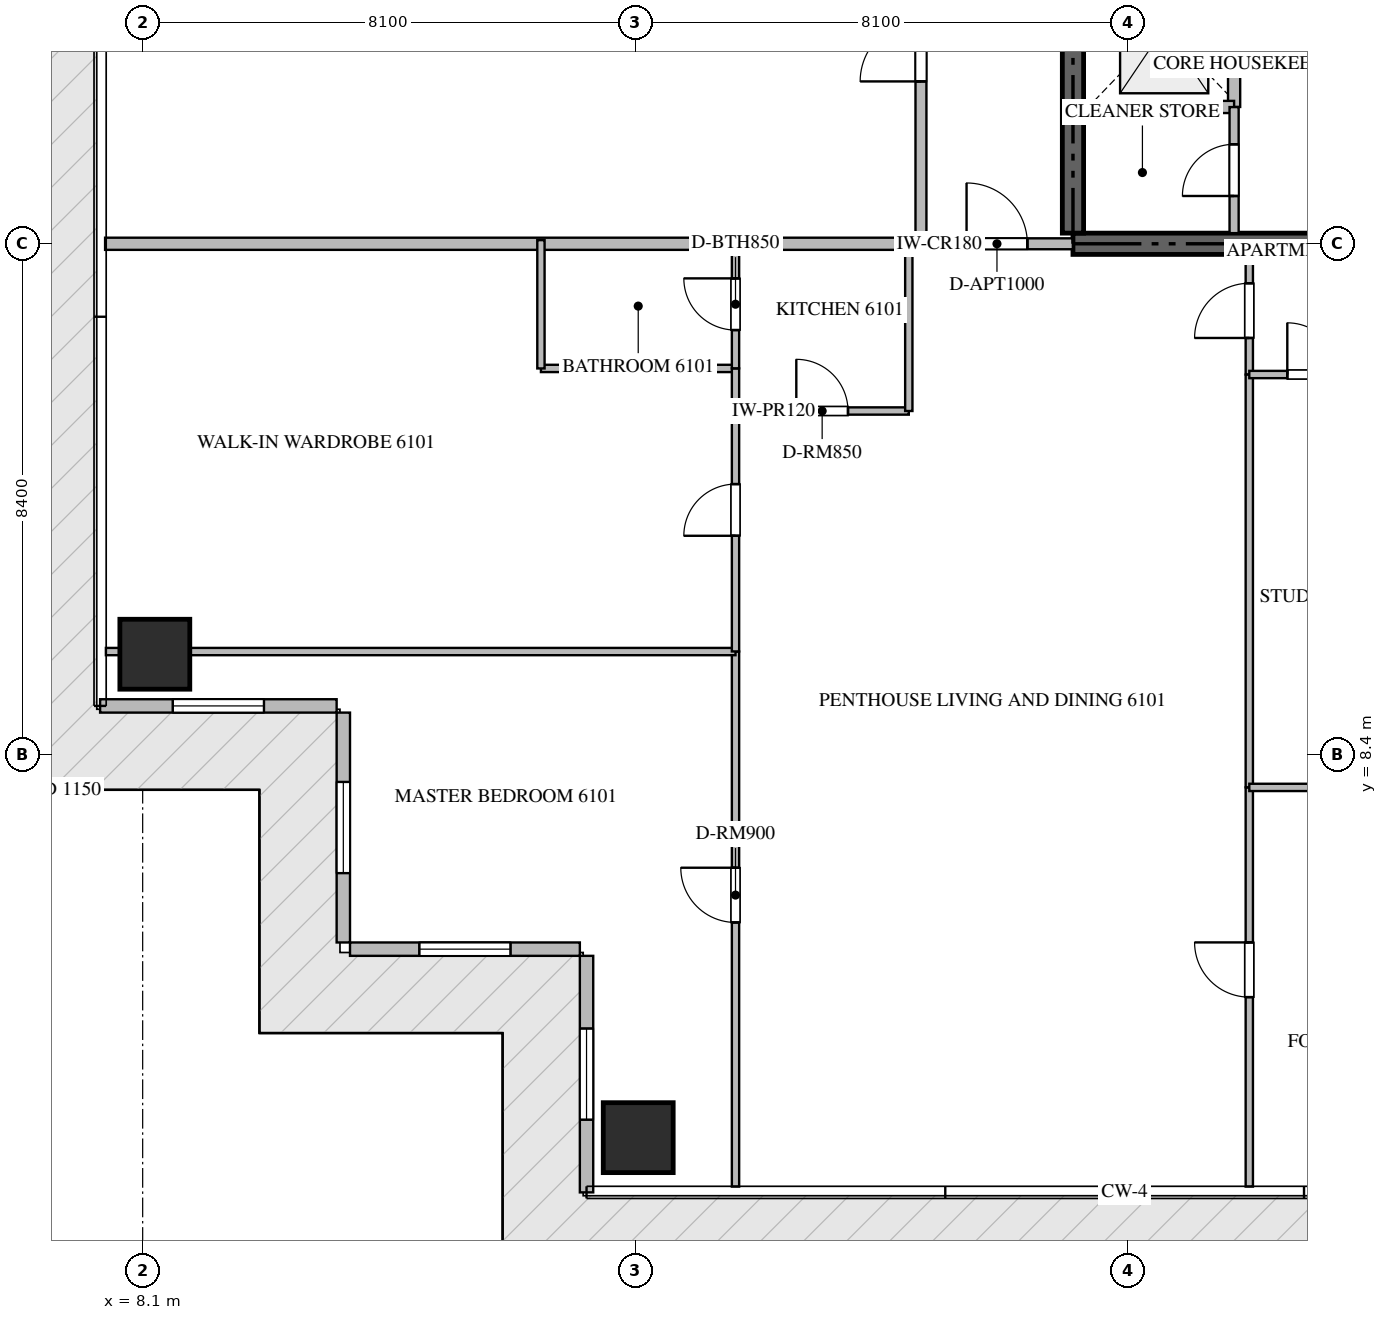
"""IFC4 building model, lengths in metres.
Left out: names, types, materials, properties, quantities, classifications, styles, units other than length and angle.
Written with IfcOpenShell. Run it as: python <this file> out.ifc"""

import sys

from ifc_helpers import new_model, si_unit, direction, frame, frame_2d, origin, origin_2d, place, context, subcontext, project, spatial, rectangle, extrude, source, transform, mapped, element, fill, save


model = new_model("IFC4")
c1 = context("Model", 3, precision=1e-05, world=origin(), true_north=direction((0.0, 1.0)))
c2 = subcontext(c1, "Body", "Model", "MODEL_VIEW")
j1 = project(units=[si_unit("LENGTHUNIT", "METRE"), si_unit("PLANEANGLEUNIT", "RADIAN")], contexts=[c1])
p1 = place(None, origin())
s1 = spatial("IfcSite", under=j1, at=p1, CompositionType="ELEMENT")
p2 = place(p1, origin())
s2 = spatial("IfcBuilding", under=s1, at=p2, CompositionType="ELEMENT")
p3 = place(p2, frame((0.0, 0.0, 245.1)))
s3 = spatial("IfcBuildingStorey", under=s2, at=p3, CompositionType="ELEMENT", Elevation=245.1)
p4 = place(p3, frame((23.4, 16.8, -0.26), z_axis=(0.0, 0.0, 1.0), x_axis=(1.0, 0.0, 0.0)))
e1 = element("IfcWall", 1, at=p4, inside=s3, PredefinedType="SHEAR", context=c2, shape_type="SweptSolid", body=[
    extrude(rectangle(XDim=18.0, YDim=0.35, at=frame_2d((9.0, 0.0))), origin(), (0.0, 0.0, 1.0), 3.848),
])
p5 = place(p3, frame((23.4, 16.975, -0.26), z_axis=(0.0, 0.0, 1.0), x_axis=(0.0, 1.0, 0.0)))
e2 = element("IfcWall", 2, at=p5, inside=s3, PredefinedType="SHEAR", context=c2, shape_type="SweptSolid", body=[
    extrude(rectangle(XDim=4.875, YDim=0.35, at=frame_2d((2.438, 0.0))), origin(), (0.0, 0.0, 1.0), 3.848),
])
m1 = source(origin(), c2, "Body", "SweptSolid", [
    extrude(rectangle(XDim=1.15, YDim=1.15, at=origin_2d()), origin(), (0.0, 0.0, 1.0), 3.85),
])
for number, where, z_axis, x_axis in (
    (3, (16.25, 2.1, -0.26), (0.0, 0.0, 1.0), (1.0, 0.0, 0.0)),
    (4, (8.3, 10.05, -0.26), (0.0, 0.0, 1.0), (1.0, 0.0, 0.0)),
):
    element("IfcColumn", number, at=place(p3, frame(where, z_axis=z_axis, x_axis=x_axis)), inside=s3, PredefinedType="COLUMN", context=c2, shape_type="MappedRepresentation", body=[
        mapped(m1, transform((0.0, 0.0, 0.0), scale=1.0)),
    ])
p6 = place(p3, frame((7.4, 9.2, 0.0), z_axis=(0.0, 0.0, 1.0), x_axis=(1.0, 0.0, 0.0)))
e5 = element("IfcWall", 5, at=p6, inside=s3, PredefinedType="ELEMENTEDWALL", context=c2, shape_type="SweptSolid", body=[
    extrude(rectangle(XDim=3.89, YDim=0.22, at=frame_2d((1.945, 0.0))), origin(), (0.0, 0.0, 1.0), 3.575),
])
p7 = place(p6, frame((1.195, 0.0, 0.65)))
e6 = element("IfcOpeningElement", 6, at=p7, cuts=e5, PredefinedType="OPENING", context=c2, shape_type="SweptSolid", body=[
    extrude(rectangle(XDim=1.5, YDim=2.25, at=frame_2d((0.75, 1.125))), frame((0.0, 0.12, 0.0), z_axis=(0.0, -1.0, 0.0), x_axis=(1.0, 0.0, 0.0)), (0.0, 0.0, 1.0), 0.24),
])
p8 = place(p3, frame((11.4, 9.09, 0.0), z_axis=(0.0, 0.0, 1.0), x_axis=(0.0, -1.0, 0.0)))
e7 = element("IfcWall", 7, at=p8, inside=s3, PredefinedType="ELEMENTEDWALL", context=c2, shape_type="SweptSolid", body=[
    extrude(rectangle(XDim=3.78, YDim=0.22, at=frame_2d((1.89, 0.0))), origin(), (0.0, 0.0, 1.0), 3.575),
])
p9 = place(p8, frame((1.14, 0.0, 0.65)))
e8 = element("IfcOpeningElement", 8, at=p9, cuts=e7, PredefinedType="OPENING", context=c2, shape_type="SweptSolid", body=[
    extrude(rectangle(XDim=1.5, YDim=2.25, at=frame_2d((0.75, 1.125))), frame((0.0, 0.12, 0.0), z_axis=(0.0, -1.0, 0.0), x_axis=(1.0, 0.0, 0.0)), (0.0, 0.0, 1.0), 0.24),
])
p10 = place(p3, frame((11.51, 5.2, 0.0), z_axis=(0.0, 0.0, 1.0), x_axis=(1.0, 0.0, 0.0)))
e9 = element("IfcWall", 9, at=p10, inside=s3, PredefinedType="ELEMENTEDWALL", context=c2, shape_type="SweptSolid", body=[
    extrude(rectangle(XDim=3.78, YDim=0.22, at=frame_2d((1.89, 0.0))), origin(), (0.0, 0.0, 1.0), 3.575),
])
p11 = place(p10, frame((1.14, 0.0, 0.65)))
e10 = element("IfcOpeningElement", 10, at=p11, cuts=e9, PredefinedType="OPENING", context=c2, shape_type="SweptSolid", body=[
    extrude(rectangle(XDim=1.5, YDim=2.25, at=frame_2d((0.75, 1.125))), frame((0.0, 0.12, 0.0), z_axis=(0.0, -1.0, 0.0), x_axis=(1.0, 0.0, 0.0)), (0.0, 0.0, 1.0), 0.24),
])
p12 = place(p3, frame((15.4, 5.09, 0.0), z_axis=(0.0, 0.0, 1.0), x_axis=(0.0, -1.0, 0.0)))
e11 = element("IfcWall", 11, at=p12, inside=s3, PredefinedType="ELEMENTEDWALL", context=c2, shape_type="SweptSolid", body=[
    extrude(rectangle(XDim=3.89, YDim=0.22, at=frame_2d((1.945, 0.0))), origin(), (0.0, 0.0, 1.0), 3.575),
])
p13 = place(p12, frame((1.195, 0.0, 0.65)))
e12 = element("IfcOpeningElement", 12, at=p13, cuts=e11, PredefinedType="OPENING", context=c2, shape_type="SweptSolid", body=[
    extrude(rectangle(XDim=1.5, YDim=2.25, at=frame_2d((0.75, 1.125))), frame((0.0, 0.12, 0.0), z_axis=(0.0, -1.0, 0.0), x_axis=(1.0, 0.0, 0.0)), (0.0, 0.0, 1.0), 0.24),
])
p14 = place(p3, frame((26.05, 19.05, 0.0), z_axis=(0.0, 0.0, 1.0), x_axis=(0.0, 1.0, 0.0)))
e13 = element("IfcWall", 13, at=p14, inside=s3, PredefinedType="STANDARD", context=c2, shape_type="SweptSolid", body=[
    extrude(rectangle(XDim=2.5, YDim=0.2, at=frame_2d((1.25, 0.0))), origin(), (0.0, 0.0, 1.0), 3.59),
])
p15 = place(p3, frame((23.575, 19.05, 0.0), z_axis=(0.0, 0.0, 1.0), x_axis=(1.0, 0.0, 0.0)))
e14 = element("IfcWall", 14, at=p15, inside=s3, PredefinedType="STANDARD", context=c2, shape_type="SweptSolid", body=[
    extrude(rectangle(XDim=2.475, YDim=0.2, at=frame_2d((1.238, 0.0))), origin(), (0.0, 0.0, 1.0), 3.59),
])
p16 = place(p3, frame((26.05, 16.975, 0.0), z_axis=(0.0, 0.0, 1.0), x_axis=(0.0, 1.0, 0.0)))
e15 = element("IfcWall", 15, at=p16, inside=s3, PredefinedType="PARTITIONING", context=c2, shape_type="SweptSolid", body=[
    extrude(rectangle(XDim=2.073, YDim=0.15, at=frame_2d((1.037, 0.0))), origin(), (0.0, 0.0, 1.0), 3.59),
])
p17 = place(p16, frame((0.611, 0.0, 0.0)))
e16 = element("IfcOpeningElement", 16, at=p17, cuts=e15, PredefinedType="OPENING", context=c2, shape_type="SweptSolid", body=[
    extrude(rectangle(XDim=0.85, YDim=2.1, at=frame_2d((0.425, 1.05))), frame((0.0, 0.085, 0.0), z_axis=(0.0, -1.0, 0.0), x_axis=(1.0, 0.0, 0.0)), (0.0, 0.0, 1.0), 0.17),
])
p18 = place(p3, frame((7.482, 16.8, 0.0), z_axis=(0.0, 0.0, 1.0), x_axis=(1.0, 0.0, 0.0)))
e17 = element("IfcWall", 17, at=p18, inside=s3, PredefinedType="PARTITIONING", context=c2, shape_type="SweptSolid", body=[
    extrude(rectangle(XDim=13.418, YDim=0.2, at=frame_2d((6.709, 0.0))), origin(), (0.0, 0.0, 1.0), 3.59),
])
p19 = place(p3, frame((20.902, 16.8, 0.0), z_axis=(0.0, 0.0, 1.0), x_axis=(1.0, 0.0, 0.0)))
e18 = element("IfcWall", 18, at=p19, inside=s3, PredefinedType="PARTITIONING", context=c2, shape_type="SweptSolid", body=[
    extrude(rectangle(XDim=2.496, YDim=0.18, at=frame_2d((1.248, 0.0))), origin(), (0.0, 0.0, 1.0), 3.59),
])
p20 = place(p19, frame((0.748, 0.0, 0.0)))
e19 = element("IfcOpeningElement", 19, at=p20, cuts=e18, PredefinedType="OPENING", context=c2, shape_type="SweptSolid", body=[
    extrude(rectangle(XDim=1.0, YDim=2.15, at=frame_2d((0.5, 1.075))), frame((0.0, 0.1, 0.0), z_axis=(0.0, -1.0, 0.0), x_axis=(1.0, 0.0, 0.0)), (0.0, 0.0, 1.0), 0.2),
])
p21 = place(p3, frame((20.9, 16.8, 0.0), z_axis=(0.0, 0.0, 1.0), x_axis=(0.0, 1.0, 0.0)))
e20 = element("IfcWall", 20, at=p21, inside=s3, PredefinedType="PARTITIONING", context=c2, shape_type="SweptSolid", body=[
    extrude(rectangle(XDim=16.8, YDim=0.18, at=frame_2d((8.4, 0.0))), origin(), (0.0, 0.0, 1.0), 3.59),
])
p22 = place(p21, frame((2.67, 0.0, 0.0)))
e21 = element("IfcOpeningElement", 21, at=p22, cuts=e20, PredefinedType="OPENING", context=c2, shape_type="SweptSolid", body=[
    extrude(rectangle(XDim=1.0, YDim=2.15, at=frame_2d((0.5, 1.075))), frame((0.0, 0.1, 0.0), z_axis=(0.0, -1.0, 0.0), x_axis=(1.0, 0.0, 0.0)), (0.0, 0.0, 1.0), 0.2),
])
p23 = place(p21, frame((11.107, 0.0, 0.0)))
e22 = element("IfcOpeningElement", 22, at=p23, cuts=e20, PredefinedType="OPENING", context=c2, shape_type="SweptSolid", body=[
    extrude(rectangle(XDim=1.0, YDim=2.15, at=frame_2d((0.5, 1.075))), frame((0.0, 0.1, 0.0), z_axis=(0.0, -1.0, 0.0), x_axis=(1.0, 0.0, 0.0)), (0.0, 0.0, 1.0), 0.2),
])
p24 = place(p3, frame((17.85, 14.05, 0.0), z_axis=(0.0, 0.0, 1.0), x_axis=(1.0, 0.0, 0.0)))
e23 = element("IfcWall", 23, at=p24, inside=s3, PredefinedType="PARTITIONING", context=c2, shape_type="SweptSolid", body=[
    extrude(rectangle(XDim=2.85, YDim=0.12, at=frame_2d((1.425, 0.0))), origin(), (0.0, 0.0, 1.0), 3.59),
])
p25 = place(p24, frame((1.0, 0.0, 0.0)))
e24 = element("IfcOpeningElement", 24, at=p25, cuts=e23, PredefinedType="OPENING", context=c2, shape_type="SweptSolid", body=[
    extrude(rectangle(XDim=0.85, YDim=2.1, at=frame_2d((0.425, 1.05))), frame((0.0, 0.07, 0.0), z_axis=(0.0, -1.0, 0.0), x_axis=(1.0, 0.0, 0.0)), (0.0, 0.0, 1.0), 0.14),
])
p26 = place(p3, frame((20.7, 14.05, 0.0), z_axis=(0.0, 0.0, 1.0), x_axis=(0.0, 1.0, 0.0)))
e25 = element("IfcWall", 25, at=p26, inside=s3, PredefinedType="PARTITIONING", context=c2, shape_type="SweptSolid", body=[
    extrude(rectangle(XDim=2.81, YDim=0.12, at=frame_2d((1.405, 0.0))), origin(), (0.0, 0.0, 1.0), 3.59),
])
p27 = place(p3, frame((17.85, 1.295, 0.0), z_axis=(0.0, 0.0, 1.0), x_axis=(0.0, 1.0, 0.0)))
e26 = element("IfcWall", 26, at=p27, inside=s3, PredefinedType="PARTITIONING", context=c2, shape_type="SweptSolid", body=[
    extrude(rectangle(XDim=8.799, YDim=0.12, at=frame_2d((4.399, 0.0))), origin(), (0.0, 0.0, 1.0), 3.59),
])
p28 = place(p27, frame((4.344, 0.0, 0.0)))
e27 = element("IfcOpeningElement", 27, at=p28, cuts=e26, PredefinedType="OPENING", context=c2, shape_type="SweptSolid", body=[
    extrude(rectangle(XDim=0.9, YDim=2.1, at=frame_2d((0.45, 1.05))), frame((0.0, 0.07, 0.0), z_axis=(0.0, -1.0, 0.0), x_axis=(1.0, 0.0, 0.0)), (0.0, 0.0, 1.0), 0.14),
])
p29 = place(p3, frame((7.495, 10.094, 0.0), z_axis=(0.0, 0.0, 1.0), x_axis=(1.0, 0.0, 0.0)))
e28 = element("IfcWall", 28, at=p29, inside=s3, PredefinedType="PARTITIONING", context=c2, shape_type="SweptSolid", body=[
    extrude(rectangle(XDim=10.355, YDim=0.12, at=frame_2d((5.177, 0.0))), origin(), (0.0, 0.0, 1.0), 3.122),
])
p30 = place(p3, frame((14.65, 14.75, 0.0), z_axis=(0.0, 0.0, 1.0), x_axis=(1.0, 0.0, 0.0)))
e29 = element("IfcWall", 29, at=p30, inside=s3, PredefinedType="PARTITIONING", context=c2, shape_type="SweptSolid", body=[
    extrude(rectangle(XDim=3.2, YDim=0.12, at=frame_2d((1.6, 0.0))), origin(), (0.0, 0.0, 1.0), 3.59),
])
p31 = place(p3, frame((14.65, 14.75, 0.0), z_axis=(0.0, 0.0, 1.0), x_axis=(0.0, 1.0, 0.0)))
e30 = element("IfcWall", 30, at=p31, inside=s3, PredefinedType="PARTITIONING", context=c2, shape_type="SweptSolid", body=[
    extrude(rectangle(XDim=2.11, YDim=0.12, at=frame_2d((1.055, 0.0))), origin(), (0.0, 0.0, 1.0), 3.59),
])
p32 = place(p3, frame((17.85, 10.096, 0.0), z_axis=(0.0, 0.0, 1.0), x_axis=(0.0, 1.0, 0.0)))
e31 = element("IfcWall", 31, at=p32, inside=s3, PredefinedType="PARTITIONING", context=c2, shape_type="SweptSolid", body=[
    extrude(rectangle(XDim=4.654, YDim=0.12, at=frame_2d((2.327, 0.0))), origin(), (0.0, 0.0, 1.0), 3.59),
])
p33 = place(p32, frame((1.902, 0.0, 0.0)))
e32 = element("IfcOpeningElement", 32, at=p33, cuts=e31, PredefinedType="OPENING", context=c2, shape_type="SweptSolid", body=[
    extrude(rectangle(XDim=0.85, YDim=2.1, at=frame_2d((0.425, 1.05))), frame((0.0, 0.07, 0.0), z_axis=(0.0, -1.0, 0.0), x_axis=(1.0, 0.0, 0.0)), (0.0, 0.0, 1.0), 0.14),
])
p34 = place(p3, frame((17.85, 14.752, 0.0), z_axis=(0.0, 0.0, 1.0), x_axis=(0.0, 1.0, 0.0)))
e33 = element("IfcWall", 33, at=p34, inside=s3, PredefinedType="PARTITIONING", context=c2, shape_type="SweptSolid", body=[
    extrude(rectangle(XDim=2.108, YDim=0.12, at=frame_2d((1.054, 0.0))), origin(), (0.0, 0.0, 1.0), 3.59),
])
p35 = place(p34, frame((0.629, 0.0, 0.0)))
e34 = element("IfcOpeningElement", 34, at=p35, cuts=e33, PredefinedType="OPENING", context=c2, shape_type="SweptSolid", body=[
    extrude(rectangle(XDim=0.85, YDim=2.1, at=frame_2d((0.425, 1.05))), frame((0.0, 0.07, 0.0), z_axis=(0.0, -1.0, 0.0), x_axis=(1.0, 0.0, 0.0)), (0.0, 0.0, 1.0), 0.14),
])
p36 = place(p3, frame((26.3, 14.65, 0.0), z_axis=(0.0, 0.0, 1.0), x_axis=(0.0, 1.0, 0.0)))
e35 = element("IfcWall", 35, at=p36, inside=s3, PredefinedType="PARTITIONING", context=c2, shape_type="SweptSolid", body=[
    extrude(rectangle(XDim=1.975, YDim=0.12, at=frame_2d((0.988, 0.0))), origin(), (0.0, 0.0, 1.0), 3.59),
])
p37 = place(p36, frame((0.601, 0.0, 0.0)))
e36 = element("IfcOpeningElement", 36, at=p37, cuts=e35, PredefinedType="OPENING", context=c2, shape_type="SweptSolid", body=[
    extrude(rectangle(XDim=0.9, YDim=2.1, at=frame_2d((0.45, 1.05))), frame((0.0, 0.07, 0.0), z_axis=(0.0, -1.0, 0.0), x_axis=(1.0, 0.0, 0.0)), (0.0, 0.0, 1.0), 0.14),
])
p38 = place(p3, frame((26.3, 1.295, 0.0), z_axis=(0.0, 0.0, 1.0), x_axis=(0.0, 1.0, 0.0)))
e37 = element("IfcWall", 37, at=p38, inside=s3, PredefinedType="PARTITIONING", context=c2, shape_type="SweptSolid", body=[
    extrude(rectangle(XDim=6.565, YDim=0.12, at=frame_2d((3.283, 0.0))), origin(), (0.0, 0.0, 1.0), 3.59),
])
p39 = place(p38, frame((3.116, 0.0, 0.0)))
e38 = element("IfcOpeningElement", 38, at=p39, cuts=e37, PredefinedType="OPENING", context=c2, shape_type="SweptSolid", body=[
    extrude(rectangle(XDim=0.9, YDim=2.1, at=frame_2d((0.45, 1.05))), frame((0.0, 0.07, 0.0), z_axis=(0.0, -1.0, 0.0), x_axis=(1.0, 0.0, 0.0)), (0.0, 0.0, 1.0), 0.14),
])
p40 = place(p3, frame((26.3, 7.862, 0.0), z_axis=(0.0, 0.0, 1.0), x_axis=(0.0, 1.0, 0.0)))
e39 = element("IfcWall", 39, at=p40, inside=s3, PredefinedType="PARTITIONING", context=c2, shape_type="SweptSolid", body=[
    extrude(rectangle(XDim=6.786, YDim=0.12, at=frame_2d((3.393, 0.0))), origin(), (0.0, 0.0, 1.0), 3.59),
])
p41 = place(p3, frame((26.3, 7.86, 0.0), z_axis=(0.0, 0.0, 1.0), x_axis=(1.0, 0.0, 0.0)))
e40 = element("IfcWall", 40, at=p41, inside=s3, PredefinedType="PARTITIONING", context=c2, shape_type="SweptSolid", body=[
    extrude(rectangle(XDim=5.15, YDim=0.12, at=frame_2d((2.575, 0.0))), origin(), (0.0, 0.0, 1.0), 3.59),
])
p42 = place(p3, frame((26.3, 14.65, 0.0), z_axis=(0.0, 0.0, 1.0), x_axis=(1.0, 0.0, 0.0)))
e41 = element("IfcWall", 41, at=p42, inside=s3, PredefinedType="PARTITIONING", context=c2, shape_type="SweptSolid", body=[
    extrude(rectangle(XDim=2.1, YDim=0.12, at=frame_2d((1.05, 0.0))), origin(), (0.0, 0.0, 1.0), 3.59),
])
p43 = place(p42, frame((0.625, 0.0, 0.0)))
e42 = element("IfcOpeningElement", 42, at=p43, cuts=e41, PredefinedType="OPENING", context=c2, shape_type="SweptSolid", body=[
    extrude(rectangle(XDim=0.85, YDim=2.1, at=frame_2d((0.425, 1.05))), frame((0.0, 0.07, 0.0), z_axis=(0.0, -1.0, 0.0), x_axis=(1.0, 0.0, 0.0)), (0.0, 0.0, 1.0), 0.14),
])
m2 = source(origin(), c2, "Body", "SweptSolid", [
    extrude(rectangle(XDim=1.5, YDim=2.25, at=frame_2d((0.75, 1.125))), frame((0.0, 0.03, 0.0), z_axis=(0.0, -1.0, 0.0), x_axis=(1.0, 0.0, 0.0)), (0.0, 0.0, 1.0), 0.06),
])
p44 = place(p7, origin())
e43 = element("IfcWindow", 43, at=p44, inside=s3, PartitioningType="SINGLE_PANEL", PredefinedType="WINDOW", context=c2, shape_type="MappedRepresentation", body=[
    mapped(m2, transform((0.0, 0.0, 0.0), scale=1.0)),
])
fill(e6, e43)
p45 = place(p9, origin())
e44 = element("IfcWindow", 44, at=p45, inside=s3, PartitioningType="SINGLE_PANEL", PredefinedType="WINDOW", context=c2, shape_type="MappedRepresentation", body=[
    mapped(m2, transform((0.0, 0.0, 0.0), scale=1.0)),
])
fill(e8, e44)
p46 = place(p11, origin())
e45 = element("IfcWindow", 45, at=p46, inside=s3, PartitioningType="SINGLE_PANEL", PredefinedType="WINDOW", context=c2, shape_type="MappedRepresentation", body=[
    mapped(m2, transform((0.0, 0.0, 0.0), scale=1.0)),
])
fill(e10, e45)
p47 = place(p13, origin())
e46 = element("IfcWindow", 46, at=p47, inside=s3, PartitioningType="SINGLE_PANEL", PredefinedType="WINDOW", context=c2, shape_type="MappedRepresentation", body=[
    mapped(m2, transform((0.0, 0.0, 0.0), scale=1.0)),
])
fill(e12, e46)
m3 = source(origin(), c2, "Body", "SweptSolid", [
    extrude(rectangle(XDim=0.85, YDim=2.1, at=frame_2d((0.425, 1.05))), frame((0.0, 0.025, 0.0), z_axis=(0.0, -1.0, 0.0), x_axis=(1.0, 0.0, 0.0)), (0.0, 0.0, 1.0), 0.05),
])
p48 = place(p17, origin())
e47 = element("IfcDoor", 47, at=p48, inside=s3, OperationType="SINGLE_SWING_LEFT", PredefinedType="DOOR", context=c2, shape_type="MappedRepresentation", body=[
    mapped(m3, transform((0.0, 0.0, 0.0), scale=1.0)),
])
fill(e16, e47)
m4 = source(origin(), c2, "Body", "SweptSolid", [
    extrude(rectangle(XDim=1.0, YDim=2.15, at=frame_2d((0.5, 1.075))), frame((0.0, 0.025, 0.0), z_axis=(0.0, -1.0, 0.0), x_axis=(1.0, 0.0, 0.0)), (0.0, 0.0, 1.0), 0.05),
])
p49 = place(p20, origin())
e48 = element("IfcDoor", 48, at=p49, inside=s3, OperationType="SINGLE_SWING_LEFT", PredefinedType="DOOR", context=c2, shape_type="MappedRepresentation", body=[
    mapped(m4, transform((0.0, 0.0, 0.0), scale=1.0)),
])
fill(e19, e48)
p50 = place(p22, origin())
e49 = element("IfcDoor", 49, at=p50, inside=s3, OperationType="SINGLE_SWING_LEFT", PredefinedType="DOOR", context=c2, shape_type="MappedRepresentation", body=[
    mapped(m4, transform((0.0, 0.0, 0.0), scale=1.0)),
])
fill(e21, e49)
p51 = place(p25, origin())
e50 = element("IfcDoor", 50, at=p51, inside=s3, OperationType="SINGLE_SWING_LEFT", PredefinedType="DOOR", context=c2, shape_type="MappedRepresentation", body=[
    mapped(m3, transform((0.0, 0.0, 0.0), scale=1.0)),
])
fill(e24, e50)
m5 = source(origin(), c2, "Body", "SweptSolid", [
    extrude(rectangle(XDim=0.9, YDim=2.1, at=frame_2d((0.45, 1.05))), frame((0.0, 0.025, 0.0), z_axis=(0.0, -1.0, 0.0), x_axis=(1.0, 0.0, 0.0)), (0.0, 0.0, 1.0), 0.05),
])
p52 = place(p28, origin())
e51 = element("IfcDoor", 51, at=p52, inside=s3, OperationType="SINGLE_SWING_RIGHT", PredefinedType="DOOR", context=c2, shape_type="MappedRepresentation", body=[
    mapped(m5, transform((0.0, 0.0, 0.0), scale=1.0)),
])
fill(e27, e51)
p53 = place(p33, origin())
e52 = element("IfcDoor", 52, at=p53, inside=s3, OperationType="SINGLE_SWING_LEFT", PredefinedType="DOOR", context=c2, shape_type="MappedRepresentation", body=[
    mapped(m3, transform((0.0, 0.0, 0.0), scale=1.0)),
])
fill(e32, e52)
p54 = place(p35, origin())
e53 = element("IfcDoor", 53, at=p54, inside=s3, OperationType="SINGLE_SWING_RIGHT", PredefinedType="DOOR", context=c2, shape_type="MappedRepresentation", body=[
    mapped(m3, transform((0.0, 0.0, 0.0), scale=1.0)),
])
fill(e34, e53)
p55 = place(p37, origin())
e54 = element("IfcDoor", 54, at=p55, inside=s3, OperationType="SINGLE_SWING_LEFT", PredefinedType="DOOR", context=c2, shape_type="MappedRepresentation", body=[
    mapped(m5, transform((0.0, 0.0, 0.0), scale=1.0)),
])
fill(e36, e54)
p56 = place(p39, origin())
e55 = element("IfcDoor", 55, at=p56, inside=s3, OperationType="SINGLE_SWING_RIGHT", PredefinedType="DOOR", context=c2, shape_type="MappedRepresentation", body=[
    mapped(m5, transform((0.0, 0.0, 0.0), scale=1.0)),
])
fill(e38, e55)
p57 = place(p43, origin())
e56 = element("IfcDoor", 56, at=p57, inside=s3, OperationType="SINGLE_SWING_LEFT", PredefinedType="DOOR", context=c2, shape_type="MappedRepresentation", body=[
    mapped(m3, transform((0.0, 0.0, 0.0), scale=1.0)),
])
fill(e42, e56)
save(model, sys.argv[1])
